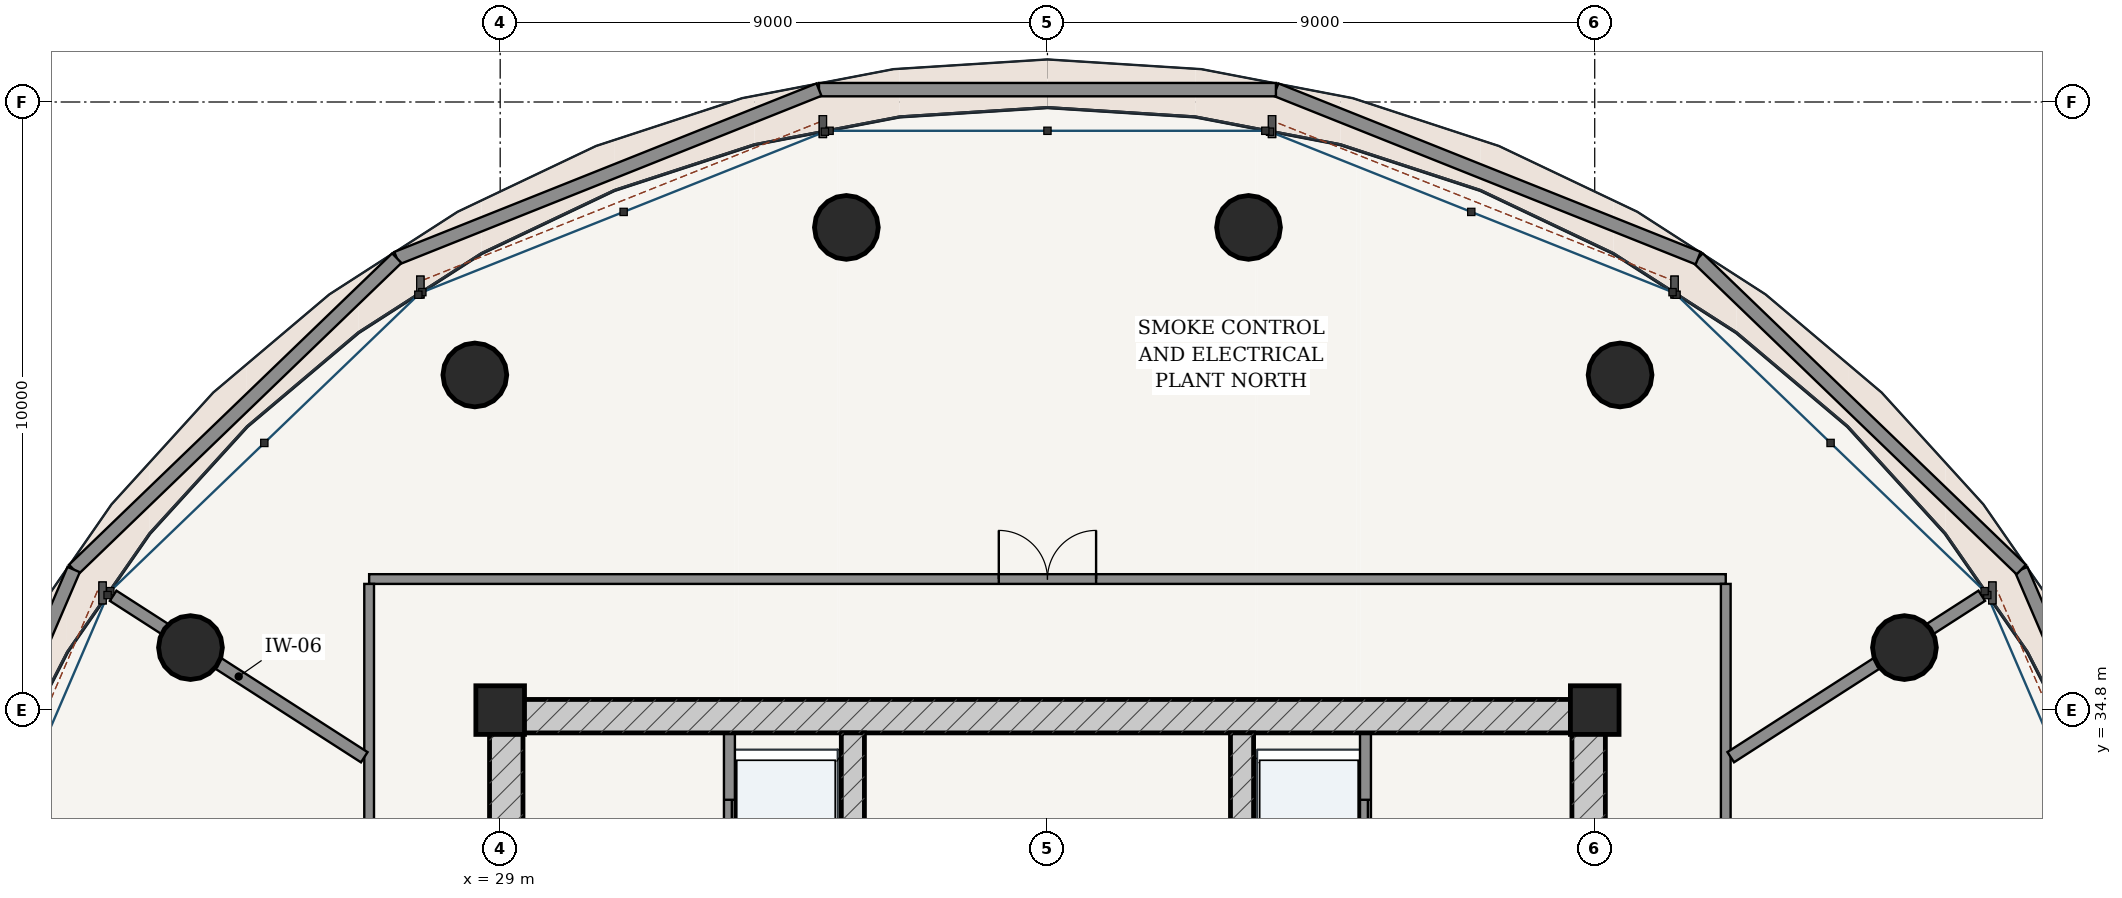
"""IFC4 building model, lengths in metres.
Left out: names, types, materials, properties, quantities, classifications, styles, units other than length and angle.
Written with IfcOpenShell. Run it as: python <this file> out.ifc"""

import sys

from ifc_helpers import new_model, si_unit, direction, frame, frame_2d, origin, origin_2d, place, context, subcontext, project, spatial, rectangle, hollow_circle, extrude, source, transform, mapped, element, fill, save


model = new_model("IFC4")
c1 = context("Model", 3, precision=1e-05, world=origin(), true_north=direction((-0.2419218956, 0.970295726276)))
c2 = subcontext(c1, "Body", "Model", "MODEL_VIEW")
j1 = project(units=[si_unit("LENGTHUNIT", "METRE"), si_unit("PLANEANGLEUNIT", "RADIAN")], contexts=[c1])
p1 = place(None, origin())
s1 = spatial("IfcSite", under=j1, at=p1, CompositionType="ELEMENT")
p2 = place(p1, origin())
s2 = spatial("IfcBuilding", under=s1, at=p2, CompositionType="ELEMENT")
p3 = place(p2, frame((0.0, 0.0, 300.7)))
s3 = spatial("IfcBuildingStorey", under=s2, at=p3, CompositionType="ELEMENT", Elevation=300.7)
for number, where, z_axis, x_axis in (
    (1, (47.0, 34.8, 0.0), (0.0, 0.0, 1.0), (1.0, 0.0, 0.0)),
    (2, (29.0, 34.8, 0.0), (0.0, 0.0, 1.0), (1.0, 0.0, 0.0)),
):
    element("IfcColumn", number, at=place(p3, frame(where, z_axis=z_axis, x_axis=x_axis)), inside=s3, PredefinedType="COLUMN", context=c2, shape_type="SweptSolid", body=[
        extrude(rectangle(XDim=0.8, YDim=0.8, at=origin_2d()), origin(), (0.0, 0.0, 1.0), 5.4),
    ])
p4 = place(p3, frame((28.825, 34.7, 0.0), z_axis=(0.0, 0.0, 1.0), x_axis=(1.0, 0.0, 0.0)))
e3 = element("IfcWall", 3, at=p4, inside=s3, PredefinedType="SHEAR", context=c2, shape_type="SweptSolid", body=[
    extrude(rectangle(XDim=18.35, YDim=0.55, at=frame_2d((9.175, 0.0))), origin(), (0.0, 0.0, 1.0), 4.98),
])
p5 = place(p3, frame((29.1, 19.175, 0.0), z_axis=(0.0, 0.0, 1.0), x_axis=(0.0, 1.0, 0.0)))
e4 = element("IfcWall", 4, at=p5, inside=s3, PredefinedType="SHEAR", context=c2, shape_type="SweptSolid", body=[
    extrude(rectangle(XDim=15.25, YDim=0.55, at=frame_2d((7.625, 0.0))), origin(), (0.0, 0.0, 1.0), 4.98),
])
p6 = place(p5, frame((9.875, 0.0, 0.0)))
e5 = element("IfcOpeningElement", 5, at=p6, cuts=e4, PredefinedType="OPENING", context=c2, shape_type="SweptSolid", body=[
    extrude(rectangle(XDim=1.5, YDim=2.2, at=frame_2d((0.75, 1.1))), frame((0.0, 0.285, 0.0), z_axis=(0.0, -1.0, 0.0), x_axis=(1.0, 0.0, 0.0)), (0.0, 0.0, 1.0), 0.57),
])
p7 = place(p3, frame((46.9, 19.175, 0.0), z_axis=(0.0, 0.0, 1.0), x_axis=(0.0, 1.0, 0.0)))
e6 = element("IfcWall", 6, at=p7, inside=s3, PredefinedType="SHEAR", context=c2, shape_type="SweptSolid", body=[
    extrude(rectangle(XDim=15.25, YDim=0.55, at=frame_2d((7.625, 0.0))), origin(), (0.0, 0.0, 1.0), 4.98),
])
p8 = place(p7, frame((9.875, 0.0, 0.0)))
e7 = element("IfcOpeningElement", 7, at=p8, cuts=e6, PredefinedType="OPENING", context=c2, shape_type="SweptSolid", body=[
    extrude(rectangle(XDim=1.5, YDim=2.2, at=frame_2d((0.75, 1.1))), frame((0.0, 0.285, 0.0), z_axis=(0.0, -1.0, 0.0), x_axis=(1.0, 0.0, 0.0)), (0.0, 0.0, 1.0), 0.57),
])
p9 = place(p3, frame((34.8, 19.175, 0.0), z_axis=(0.0, 0.0, 1.0), x_axis=(0.0, 1.0, 0.0)))
e8 = element("IfcWall", 8, at=p9, inside=s3, PredefinedType="SHEAR", context=c2, shape_type="SweptSolid", body=[
    extrude(rectangle(XDim=15.25, YDim=0.38, at=frame_2d((7.625, 0.0))), origin(), (0.0, 0.0, 1.0), 4.98),
])
p10 = place(p9, frame((7.8, 0.0, 0.0)))
e9 = element("IfcOpeningElement", 9, at=p10, cuts=e8, PredefinedType="OPENING", context=c2, shape_type="SweptSolid", body=[
    extrude(rectangle(XDim=1.05, YDim=2.15, at=frame_2d((0.525, 1.075))), frame((0.0, 0.2, 0.0), z_axis=(0.0, -1.0, 0.0), x_axis=(1.0, 0.0, 0.0)), (0.0, 0.0, 1.0), 0.4),
])
p11 = place(p3, frame((41.2, 19.175, 0.0), z_axis=(0.0, 0.0, 1.0), x_axis=(0.0, 1.0, 0.0)))
e10 = element("IfcWall", 10, at=p11, inside=s3, PredefinedType="SHEAR", context=c2, shape_type="SweptSolid", body=[
    extrude(rectangle(XDim=15.25, YDim=0.38, at=frame_2d((7.625, 0.0))), origin(), (0.0, 0.0, 1.0), 4.98),
])
p12 = place(p11, frame((7.8, 0.0, 0.0)))
e11 = element("IfcOpeningElement", 11, at=p12, cuts=e10, PredefinedType="OPENING", context=c2, shape_type="SweptSolid", body=[
    extrude(rectangle(XDim=1.05, YDim=2.15, at=frame_2d((0.525, 1.075))), frame((0.0, 0.2, 0.0), z_axis=(0.0, -1.0, 0.0), x_axis=(1.0, 0.0, 0.0)), (0.0, 0.0, 1.0), 0.4),
])
for number, where, z_axis, x_axis in (
    (12, (52.094, 35.828, 0.0), (0.0, 0.0, 1.0), (1.0, 0.0, 0.0)),
    (13, (47.417, 40.311, 0.0), (0.0, 0.0, 1.0), (1.0, 0.0, 0.0)),
    (14, (41.307, 42.738, 0.0), (0.0, 0.0, 1.0), (1.0, 0.0, 0.0)),
    (15, (34.693, 42.738, 0.0), (0.0, 0.0, 1.0), (1.0, 0.0, 0.0)),
    (16, (28.583, 40.311, 0.0), (0.0, 0.0, 1.0), (1.0, 0.0, 0.0)),
    (17, (23.906, 35.828, 0.0), (0.0, 0.0, 1.0), (1.0, 0.0, 0.0)),
):
    element("IfcColumn", number, at=place(p3, frame(where, z_axis=z_axis, x_axis=x_axis)), inside=s3, PredefinedType="COLUMN", context=c2, shape_type="SweptSolid", body=[
        extrude(hollow_circle(Radius=0.525, WallThickness=0.035, at=origin_2d()), origin(), (0.0, 0.0, 1.0), 5.4),
    ])
p13 = place(p3, frame((56.89, 30.421, 0.0), z_axis=(0.0, 0.0, 1.0), x_axis=(-0.394894199948, 0.918726602884, 0.0)))
e18 = element("IfcWall", 18, at=p13, inside=s3, PredefinedType="PARAPET", context=c2, shape_type="SweptSolid", body=[
    extrude(rectangle(XDim=7.282, YDim=0.22, at=frame_2d((3.641, 0.0))), origin(), (0.0, 0.0, 1.0), 1.15),
])
p14 = place(p3, frame((54.014, 37.111, 0.0), z_axis=(0.0, 0.0, 1.0), x_axis=(-0.720069776959, 0.693901661845, 0.0)))
e19 = element("IfcWall", 19, at=p14, inside=s3, PredefinedType="PARAPET", context=c2, shape_type="SweptSolid", body=[
    extrude(rectangle(XDim=7.38, YDim=0.22, at=frame_2d((3.69, 0.0))), origin(), (0.0, 0.0, 1.0), 1.15),
])
p15 = place(p3, frame((48.7, 42.232, 0.0), z_axis=(0.0, 0.0, 1.0), x_axis=(-0.928748972375, 0.370709247677, 0.0)))
e20 = element("IfcWall", 20, at=p15, inside=s3, PredefinedType="PARAPET", context=c2, shape_type="SweptSolid", body=[
    extrude(rectangle(XDim=7.476, YDim=0.22, at=frame_2d((3.738, 0.0))), origin(), (0.0, 0.0, 1.0), 1.15),
])
p16 = place(p3, frame((41.757, 45.003, 0.0), z_axis=(0.0, 0.0, 1.0), x_axis=(-1.0, 0.0, 0.0)))
e21 = element("IfcWall", 21, at=p16, inside=s3, PredefinedType="PARAPET", context=c2, shape_type="SweptSolid", body=[
    extrude(rectangle(XDim=7.515, YDim=0.22, at=frame_2d((3.757, 0.0))), origin(), (0.0, 0.0, 1.0), 1.15),
])
p17 = place(p3, frame((34.243, 45.003, 0.0), z_axis=(0.0, 0.0, 1.0), x_axis=(-0.928748972375, -0.370709247677, 0.0)))
e22 = element("IfcWall", 22, at=p17, inside=s3, PredefinedType="PARAPET", context=c2, shape_type="SweptSolid", body=[
    extrude(rectangle(XDim=7.476, YDim=0.22, at=frame_2d((3.738, 0.0))), origin(), (0.0, 0.0, 1.0), 1.15),
])
p18 = place(p3, frame((27.3, 42.232, 0.0), z_axis=(0.0, 0.0, 1.0), x_axis=(-0.720069776959, -0.693901661845, 0.0)))
e23 = element("IfcWall", 23, at=p18, inside=s3, PredefinedType="PARAPET", context=c2, shape_type="SweptSolid", body=[
    extrude(rectangle(XDim=7.38, YDim=0.22, at=frame_2d((3.69, 0.0))), origin(), (0.0, 0.0, 1.0), 1.15),
])
p19 = place(p3, frame((21.986, 37.111, 0.0), z_axis=(0.0, 0.0, 1.0), x_axis=(-0.394894199948, -0.918726602884, 0.0)))
e24 = element("IfcWall", 24, at=p19, inside=s3, PredefinedType="PARAPET", context=c2, shape_type="SweptSolid", body=[
    extrude(rectangle(XDim=7.282, YDim=0.22, at=frame_2d((3.641, 0.0))), origin(), (0.0, 0.0, 1.0), 1.15),
])
p20 = place(p3, frame((32.77, 28.52, 0.0), z_axis=(0.0, 0.0, 1.0), x_axis=(0.0, 1.0, 0.0)))
e25 = element("IfcWall", 25, at=p20, inside=s3, PredefinedType="PARTITIONING", context=c2, shape_type="SweptSolid", body=[
    extrude(rectangle(XDim=5.905, YDim=0.18, at=frame_2d((2.953, 0.0))), origin(), (0.0, 0.0, 1.0), 4.98),
])
p21 = place(p20, frame((3.655, 0.0, 0.0)))
e26 = element("IfcOpeningElement", 26, at=p21, cuts=e25, PredefinedType="OPENING", context=c2, shape_type="SweptSolid", body=[
    extrude(rectangle(XDim=1.15, YDim=2.2, at=frame_2d((0.575, 1.1))), frame((0.0, 0.1, 0.0), z_axis=(0.0, -1.0, 0.0), x_axis=(1.0, 0.0, 0.0)), (0.0, 0.0, 1.0), 0.2),
])
p22 = place(p20, frame((0.73, 0.0, 0.0)))
e27 = element("IfcOpeningElement", 27, at=p22, cuts=e25, PredefinedType="OPENING", context=c2, shape_type="SweptSolid", body=[
    extrude(rectangle(XDim=1.2, YDim=2.25, at=frame_2d((0.6, 1.125))), frame((0.0, 0.1, 0.0), z_axis=(0.0, -1.0, 0.0), x_axis=(1.0, 0.0, 0.0)), (0.0, 0.0, 1.0), 0.2),
])
p23 = place(p3, frame((43.23, 28.52, 0.0), z_axis=(0.0, 0.0, 1.0), x_axis=(0.0, 1.0, 0.0)))
e28 = element("IfcWall", 28, at=p23, inside=s3, PredefinedType="PARTITIONING", context=c2, shape_type="SweptSolid", body=[
    extrude(rectangle(XDim=5.905, YDim=0.18, at=frame_2d((2.953, 0.0))), origin(), (0.0, 0.0, 1.0), 4.98),
])
p24 = place(p23, frame((0.905, 0.0, 0.0)))
e29 = element("IfcOpeningElement", 29, at=p24, cuts=e28, PredefinedType="OPENING", context=c2, shape_type="SweptSolid", body=[
    extrude(rectangle(XDim=0.85, YDim=2.1, at=frame_2d((0.425, 1.05))), frame((0.0, 0.1, 0.0), z_axis=(0.0, -1.0, 0.0), x_axis=(1.0, 0.0, 0.0)), (0.0, 0.0, 1.0), 0.2),
])
p25 = place(p23, frame((3.655, 0.0, 0.0)))
e30 = element("IfcOpeningElement", 30, at=p25, cuts=e28, PredefinedType="OPENING", context=c2, shape_type="SweptSolid", body=[
    extrude(rectangle(XDim=1.15, YDim=2.2, at=frame_2d((0.575, 1.1))), frame((0.0, 0.1, 0.0), z_axis=(0.0, -1.0, 0.0), x_axis=(1.0, 0.0, 0.0)), (0.0, 0.0, 1.0), 0.2),
])
p26 = place(p3, frame((26.845, 36.955, 0.0), z_axis=(0.0, 0.0, 1.0), x_axis=(1.0, 0.0, 0.0)))
e31 = element("IfcWall", 31, at=p26, inside=s3, PredefinedType="PARTITIONING", context=c2, shape_type="SweptSolid", body=[
    extrude(rectangle(XDim=22.31, YDim=0.16, at=frame_2d((11.155, 0.0))), origin(), (0.0, 0.0, 1.0), 4.552),
])
p27 = place(p26, frame((10.355, 0.0, 0.0)))
e32 = element("IfcOpeningElement", 32, at=p27, cuts=e31, PredefinedType="OPENING", context=c2, shape_type="SweptSolid", body=[
    extrude(rectangle(XDim=1.6, YDim=2.25, at=frame_2d((0.8, 1.125))), frame((0.0, 0.09, 0.0), z_axis=(0.0, -1.0, 0.0), x_axis=(1.0, 0.0, 0.0)), (0.0, 0.0, 1.0), 0.18),
])
p28 = place(p3, frame((26.845, 16.725, 0.0), z_axis=(0.0, 0.0, 1.0), x_axis=(0.0, 1.0, 0.0)))
e33 = element("IfcWall", 33, at=p28, inside=s3, PredefinedType="PARTITIONING", context=c2, shape_type="SweptSolid", body=[
    extrude(rectangle(XDim=20.15, YDim=0.16, at=frame_2d((10.075, 0.0))), origin(), (0.0, 0.0, 1.0), 4.552),
])
p29 = place(p28, frame((9.325, 0.0, 0.0)))
e34 = element("IfcOpeningElement", 34, at=p29, cuts=e33, PredefinedType="OPENING", context=c2, shape_type="SweptSolid", body=[
    extrude(rectangle(XDim=1.5, YDim=2.2, at=frame_2d((0.75, 1.1))), frame((0.0, 0.09, 0.0), z_axis=(0.0, -1.0, 0.0), x_axis=(1.0, 0.0, 0.0)), (0.0, 0.0, 1.0), 0.18),
])
p30 = place(p3, frame((49.155, 16.725, 0.0), z_axis=(0.0, 0.0, 1.0), x_axis=(0.0, 1.0, 0.0)))
e35 = element("IfcWall", 35, at=p30, inside=s3, PredefinedType="PARTITIONING", context=c2, shape_type="SweptSolid", body=[
    extrude(rectangle(XDim=20.15, YDim=0.16, at=frame_2d((10.075, 0.0))), origin(), (0.0, 0.0, 1.0), 4.552),
])
p31 = place(p30, frame((9.275, 0.0, 0.0)))
e36 = element("IfcOpeningElement", 36, at=p31, cuts=e35, PredefinedType="OPENING", context=c2, shape_type="SweptSolid", body=[
    extrude(rectangle(XDim=1.6, YDim=2.25, at=frame_2d((0.8, 1.125))), frame((0.0, 0.09, 0.0), z_axis=(0.0, -1.0, 0.0), x_axis=(1.0, 0.0, 0.0)), (0.0, 0.0, 1.0), 0.18),
])
p32 = place(p3, frame((26.765, 34.024, 0.0), z_axis=(0.0, 0.0, 1.0), x_axis=(-0.841100921619, 0.540878211478, 0.0)))
e37 = element("IfcWall", 37, at=p32, inside=s3, PredefinedType="PARTITIONING", context=c2, shape_type="SweptSolid", body=[
    extrude(rectangle(XDim=4.91, YDim=0.2, at=frame_2d((2.455, 0.0))), origin(), (0.0, 0.0, 1.0), 4.33),
])
p33 = place(p3, frame((49.237, 34.026, 0.0), z_axis=(0.0, 0.0, 1.0), x_axis=(0.841126754859, 0.540838036995, 0.0)))
e38 = element("IfcWall", 38, at=p33, inside=s3, PredefinedType="PARTITIONING", context=c2, shape_type="SweptSolid", body=[
    extrude(rectangle(XDim=4.908, YDim=0.2, at=frame_2d((2.454, 0.0))), origin(), (0.0, 0.0, 1.0), 4.33),
])
m1 = source(origin(), c2, "Body", "SweptSolid", [
    extrude(rectangle(XDim=1.15, YDim=2.2, at=frame_2d((0.575, 1.1))), frame((0.0, 0.025, 0.0), z_axis=(0.0, -1.0, 0.0), x_axis=(1.0, 0.0, 0.0)), (0.0, 0.0, 1.0), 0.05),
])
p34 = place(p21, origin())
e39 = element("IfcDoor", 39, at=p34, inside=s3, OperationType="DOUBLE_DOOR_SLIDING", PredefinedType="DOOR", context=c2, shape_type="MappedRepresentation", body=[
    mapped(m1, transform((0.0, 0.0, 0.0), scale=1.0)),
])
fill(e26, e39)
p35 = place(p25, origin())
e40 = element("IfcDoor", 40, at=p35, inside=s3, OperationType="DOUBLE_DOOR_SLIDING", PredefinedType="DOOR", context=c2, shape_type="MappedRepresentation", body=[
    mapped(m1, transform((0.0, 0.0, 0.0), scale=1.0)),
])
fill(e30, e40)
m2 = source(origin(), c2, "Body", "SweptSolid", [
    extrude(rectangle(XDim=1.6, YDim=2.25, at=frame_2d((0.8, 1.125))), frame((0.0, 0.025, 0.0), z_axis=(0.0, -1.0, 0.0), x_axis=(1.0, 0.0, 0.0)), (0.0, 0.0, 1.0), 0.05),
])
p36 = place(p27, origin())
e41 = element("IfcDoor", 41, at=p36, inside=s3, OperationType="DOUBLE_DOOR_SINGLE_SWING", PredefinedType="DOOR", context=c2, shape_type="MappedRepresentation", body=[
    mapped(m2, transform((0.0, 0.0, 0.0), scale=1.0)),
])
fill(e32, e41)
save(model, sys.argv[1])
